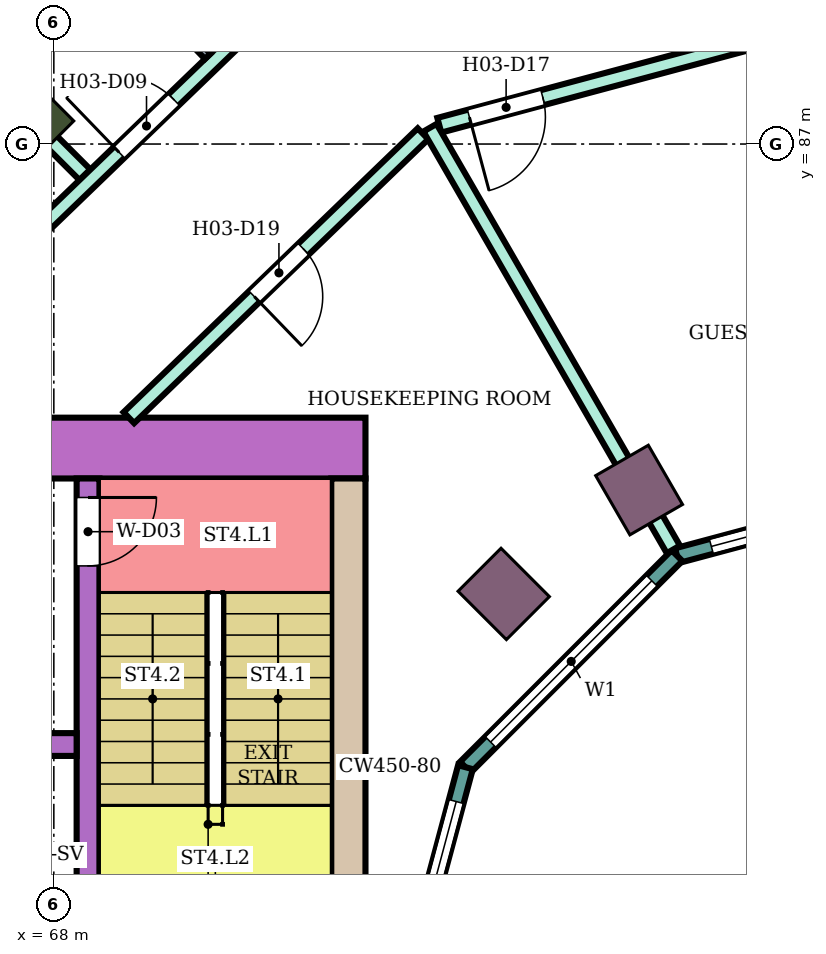
"""IFC4 building model, lengths in metres.
Left out: names, types, materials, properties, quantities, classifications, styles, units other than length and angle.
Written with IfcOpenShell. Run it as: python <this file> out.ifc"""

import sys

from ifc_helpers import new_model, si_unit, direction, frame, frame_2d, origin, origin_2d, place, context, subcontext, project, spatial, rectangle, extrude, element, fill, save


model = new_model("IFC4")
c1 = context("Model", 3, precision=1e-05, world=origin(), true_north=direction((0.0, 1.0)))
c2 = subcontext(c1, "Body", "Model", "MODEL_VIEW")
j1 = project(units=[si_unit("LENGTHUNIT", "METRE"), si_unit("PLANEANGLEUNIT", "RADIAN")], contexts=[c1])
p1 = place(None, origin())
s1 = spatial("IfcSite", under=j1, at=p1, CompositionType="ELEMENT")
p2 = place(p1, origin())
s2 = spatial("IfcBuilding", under=s1, at=p2, CompositionType="ELEMENT")
p3 = place(p2, frame((0.0, 0.0, 51.6)))
s3 = spatial("IfcBuildingStorey", under=s2, at=p3, CompositionType="ELEMENT", Elevation=51.6)
p4 = place(p3, frame((67.555, 87.445, 0.0), z_axis=(0.0, 0.0, 1.0), x_axis=(-0.707106781187, 0.707106781187, 0.0)))
e1 = element("IfcColumn", 1, at=p4, inside=s3, PredefinedType="COLUMN", context=c2, shape_type="SweptSolid", body=[
    extrude(rectangle(XDim=1.2, YDim=0.8, at=origin_2d()), origin(), (0.0, 0.0, 1.0), 3.8),
])
for number, where, z_axis, x_axis in (
    (2, (75.7, 82.448, 0.0), (0.0, 0.0, 1.0), (-0.5, 0.866, 0.0)),
    (3, (73.919, 81.081, 0.0), (0.0, 0.0, 1.0), (-0.707, 0.707, 0.0)),
):
    element("IfcColumn", number, at=place(p3, frame(where, z_axis=z_axis, x_axis=x_axis)), inside=s3, PredefinedType="COLUMN", context=c2, shape_type="SweptSolid", body=[
        extrude(rectangle(XDim=0.9, YDim=0.8, at=origin_2d()), origin(), (0.0, 0.0, 1.0), 3.8),
    ])
p5 = place(p3, frame((72.1, 83.0, 0.0), z_axis=(0.0, 0.0, 1.0), x_axis=(-1.0, 0.0, 0.0)))
e4 = element("IfcWall", 4, at=p5, inside=s3, PredefinedType="SHEAR", context=c2, shape_type="SweptSolid", body=[
    extrude(rectangle(XDim=14.7, YDim=0.8, at=frame_2d((7.35, 0.0))), origin(), (0.0, 0.0, 1.0), 3.48),
])
p6 = place(p5, frame((4.2, 0.0, 0.0)))
e5 = element("IfcOpeningElement", 5, at=p6, cuts=e4, PredefinedType="OPENING", context=c2, shape_type="SweptSolid", body=[
    extrude(rectangle(XDim=2.4, YDim=2.4, at=frame_2d((1.2, 1.2))), frame((0.0, 0.41, 0.0), z_axis=(0.0, -1.0, 0.0), x_axis=(1.0, 0.0, 0.0)), (0.0, 0.0, 1.0), 0.82),
])
p7 = place(p3, frame((71.875, 82.6, 0.0), z_axis=(0.0, 0.0, 1.0), x_axis=(0.0, -1.0, 0.0)))
e6 = element("IfcWall", 6, at=p7, inside=s3, PredefinedType="SHEAR", context=c2, shape_type="SweptSolid", body=[
    extrude(rectangle(XDim=7.6, YDim=0.45, at=frame_2d((3.8, 0.0))), origin(), (0.0, 0.0, 1.0), 3.48),
])
p8 = place(p3, frame((68.45, 82.6, 0.0), z_axis=(0.0, 0.0, 1.0), x_axis=(0.0, -1.0, 0.0)))
e7 = element("IfcWall", 7, at=p8, inside=s3, PredefinedType="SHEAR", context=c2, shape_type="SweptSolid", body=[
    extrude(rectangle(XDim=7.6, YDim=0.3, at=frame_2d((3.8, 0.0))), origin(), (0.0, 0.0, 1.0), 3.48),
])
p9 = place(p8, frame((0.25, 0.0, 0.0)))
e8 = element("IfcOpeningElement", 8, at=p9, cuts=e7, PredefinedType="OPENING", context=c2, shape_type="SweptSolid", body=[
    extrude(rectangle(XDim=0.9, YDim=2.1, at=frame_2d((0.45, 1.05))), frame((0.0, 0.16, 0.0), z_axis=(0.0, -1.0, 0.0), x_axis=(1.0, 0.0, 0.0)), (0.0, 0.0, 1.0), 0.32),
])
p10 = place(p3, frame((68.3, 79.1, 0.0), z_axis=(0.0, 0.0, 1.0), x_axis=(-1.0, 0.0, 0.0)))
e9 = element("IfcWall", 9, at=p10, inside=s3, PredefinedType="SHEAR", context=c2, shape_type="SweptSolid", body=[
    extrude(rectangle(XDim=10.9, YDim=0.3, at=frame_2d((5.45, 0.0))), origin(), (0.0, 0.0, 1.0), 3.48),
])
p11 = place(p10, frame((0.4, 0.0, 0.0)))
e10 = element("IfcOpeningElement", 10, at=p11, cuts=e9, PredefinedType="OPENING", context=c2, shape_type="SweptSolid", body=[
    extrude(rectangle(XDim=1.4, YDim=2.1, at=frame_2d((0.7, 1.05))), frame((0.0, 0.16, 0.0), z_axis=(0.0, -1.0, 0.0), x_axis=(1.0, 0.0, 0.0)), (0.0, 0.0, 1.0), 0.32),
])
p12 = place(p10, frame((5.4, 0.0, 0.0)))
e11 = element("IfcOpeningElement", 11, at=p12, cuts=e9, PredefinedType="OPENING", context=c2, shape_type="SweptSolid", body=[
    extrude(rectangle(XDim=1.4, YDim=2.1, at=frame_2d((0.7, 1.05))), frame((0.0, 0.16, 0.0), z_axis=(0.0, -1.0, 0.0), x_axis=(1.0, 0.0, 0.0)), (0.0, 0.0, 1.0), 0.32),
])
p13 = place(p10, frame((8.1, 0.0, 0.0)))
e12 = element("IfcOpeningElement", 12, at=p13, cuts=e9, PredefinedType="OPENING", context=c2, shape_type="SweptSolid", body=[
    extrude(rectangle(XDim=1.0, YDim=2.1, at=frame_2d((0.5, 1.05))), frame((0.0, 0.16, 0.0), z_axis=(0.0, -1.0, 0.0), x_axis=(1.0, 0.0, 0.0)), (0.0, 0.0, 1.0), 0.32),
])
p14 = place(p3, frame((80.0, 82.604, 0.0), z_axis=(0.0, 0.0, 1.0), x_axis=(-0.965933654434, -0.258789828301, 0.0)))
e13 = element("IfcWall", 13, at=p14, inside=s3, PredefinedType="NOTDEFINED", context=c2, shape_type="SweptSolid", body=[
    extrude(rectangle(XDim=3.936, YDim=0.2, at=frame_2d((1.968, 0.0))), origin(), (0.0, 0.0, 1.0), 3.8),
])
p15 = place(p14, frame((0.468, 0.0, 0.9)))
e14 = element("IfcOpeningElement", 14, at=p15, cuts=e13, PredefinedType="OPENING", context=c2, shape_type="SweptSolid", body=[
    extrude(rectangle(XDim=3.0, YDim=2.3, at=frame_2d((1.5, 1.15))), frame((0.0, 0.11, 0.0), z_axis=(0.0, -1.0, 0.0), x_axis=(1.0, 0.0, 0.0)), (0.0, 0.0, 1.0), 0.22),
])
p16 = place(p3, frame((76.198, 81.585, 0.0), z_axis=(0.0, 0.0, 1.0), x_axis=(-0.707106781187, -0.707106781187, 0.0)))
e15 = element("IfcWall", 15, at=p16, inside=s3, PredefinedType="NOTDEFINED", context=c2, shape_type="SweptSolid", body=[
    extrude(rectangle(XDim=3.936, YDim=0.2, at=frame_2d((1.968, 0.0))), origin(), (0.0, 0.0, 1.0), 3.8),
])
p17 = place(p16, frame((0.468, 0.0, 0.9)))
e16 = element("IfcOpeningElement", 16, at=p17, cuts=e15, PredefinedType="OPENING", context=c2, shape_type="SweptSolid", body=[
    extrude(rectangle(XDim=3.0, YDim=2.3, at=frame_2d((1.5, 1.15))), frame((0.0, 0.11, 0.0), z_axis=(0.0, -1.0, 0.0), x_axis=(1.0, 0.0, 0.0)), (0.0, 0.0, 1.0), 0.22),
])
p18 = place(p3, frame((73.415, 78.802, 0.0), z_axis=(0.0, 0.0, 1.0), x_axis=(-0.258789828301, -0.965933654434, 0.0)))
e17 = element("IfcWall", 17, at=p18, inside=s3, PredefinedType="NOTDEFINED", context=c2, shape_type="SweptSolid", body=[
    extrude(rectangle(XDim=3.936, YDim=0.2, at=frame_2d((1.968, 0.0))), origin(), (0.0, 0.0, 1.0), 3.8),
])
p19 = place(p18, frame((0.468, 0.0, 0.9)))
e18 = element("IfcOpeningElement", 18, at=p19, cuts=e17, PredefinedType="OPENING", context=c2, shape_type="SweptSolid", body=[
    extrude(rectangle(XDim=3.0, YDim=2.3, at=frame_2d((1.5, 1.15))), frame((0.0, 0.11, 0.0), z_axis=(0.0, -1.0, 0.0), x_axis=(1.0, 0.0, 0.0)), (0.0, 0.0, 1.0), 0.22),
])
p20 = place(p3, frame((63.598, 91.408, 0.0), z_axis=(0.0, 0.0, 1.0), x_axis=(0.706999146394, -0.707214399597, 0.0)))
e19 = element("IfcWall", 19, at=p20, inside=s3, PredefinedType="PARTITIONING", context=c2, shape_type="SweptSolid", body=[
    extrude(rectangle(XDim=6.805, YDim=0.2, at=frame_2d((3.403, 0.0))), origin(), (0.0, 0.0, 1.0), 3.35),
])
p21 = place(p3, frame((66.797, 84.9, 0.0), z_axis=(0.0, 0.0, 1.0), x_axis=(0.719692092412, 0.694293376116, 0.0)))
e20 = element("IfcWall", 20, at=p21, inside=s3, PredefinedType="PARTITIONING", context=c2, shape_type="SweptSolid", body=[
    extrude(rectangle(XDim=6.584, YDim=0.2, at=frame_2d((3.292, 0.0))), origin(), (0.0, 0.0, 1.0), 3.35),
])
p22 = place(p21, frame((2.866, 0.0, 0.0)))
e21 = element("IfcOpeningElement", 21, at=p22, cuts=e20, PredefinedType="OPENING", context=c2, shape_type="SweptSolid", body=[
    extrude(rectangle(XDim=1.0, YDim=2.1, at=frame_2d((0.5, 1.05))), frame((0.0, 0.11, 0.0), z_axis=(0.0, -1.0, 0.0), x_axis=(1.0, 0.0, 0.0)), (0.0, 0.0, 1.0), 0.22),
])
p23 = place(p3, frame((68.987, 83.4, 0.0), z_axis=(0.0, 0.0, 1.0), x_axis=(0.719547721855, 0.694442996922, 0.0)))
e22 = element("IfcWall", 22, at=p23, inside=s3, PredefinedType="PARTITIONING", context=c2, shape_type="SweptSolid", body=[
    extrude(rectangle(XDim=5.378, YDim=0.2, at=frame_2d((2.689, 0.0))), origin(), (0.0, 0.0, 1.0), 3.35),
])
p24 = place(p23, frame((2.294, 0.0, 0.0)))
e23 = element("IfcOpeningElement", 23, at=p24, cuts=e22, PredefinedType="OPENING", context=c2, shape_type="SweptSolid", body=[
    extrude(rectangle(XDim=0.9, YDim=2.1, at=frame_2d((0.45, 1.05))), frame((0.0, 0.11, 0.0), z_axis=(0.0, -1.0, 0.0), x_axis=(1.0, 0.0, 0.0)), (0.0, 0.0, 1.0), 0.22),
])
p25 = place(p3, frame((73.071, 87.247, 0.0), z_axis=(0.0, 0.0, 1.0), x_axis=(0.965931651205, 0.258797305243, 0.0)))
e24 = element("IfcWall", 24, at=p25, inside=s3, PredefinedType="PARTITIONING", context=c2, shape_type="SweptSolid", body=[
    extrude(rectangle(XDim=7.043, YDim=0.2, at=frame_2d((3.521, 0.0))), origin(), (0.0, 0.0, 1.0), 3.35),
])
p26 = place(p25, frame((0.41, 0.0, 0.0)))
e25 = element("IfcOpeningElement", 25, at=p26, cuts=e24, PredefinedType="OPENING", context=c2, shape_type="SweptSolid", body=[
    extrude(rectangle(XDim=1.0, YDim=2.1, at=frame_2d((0.5, 1.05))), frame((0.0, 0.11, 0.0), z_axis=(0.0, -1.0, 0.0), x_axis=(1.0, 0.0, 0.0)), (0.0, 0.0, 1.0), 0.22),
])
p27 = place(p3, frame((72.949, 87.214, 0.0), z_axis=(0.0, 0.0, 1.0), x_axis=(0.499927021214, -0.866067534006, 0.0)))
e26 = element("IfcWall", 26, at=p27, inside=s3, PredefinedType="PARTITIONING", context=c2, shape_type="SweptSolid", body=[
    extrude(rectangle(XDim=6.405, YDim=0.2, at=frame_2d((3.203, 0.0))), origin(), (0.0, 0.0, 1.0), 3.35),
])
p28 = place(p3, frame((68.185, 90.06, 0.0), z_axis=(0.0, 0.0, 1.0), x_axis=(0.69446127412, -0.719530081892, 0.0)))
e27 = element("IfcWall", 27, at=p28, inside=s3, PredefinedType="PARTITIONING", context=c2, shape_type="SweptSolid", body=[
    extrude(rectangle(XDim=2.649, YDim=0.1, at=frame_2d((1.324, 0.0))), origin(), (0.0, 0.0, 1.0), 3.35),
])
p29 = place(p28, frame((0.95, 0.0, 0.0)))
e28 = element("IfcOpeningElement", 28, at=p29, cuts=e27, PredefinedType="OPENING", context=c2, shape_type="SweptSolid", body=[
    extrude(rectangle(XDim=0.8, YDim=2.1, at=frame_2d((0.4, 1.05))), frame((0.0, 0.06, 0.0), z_axis=(0.0, -1.0, 0.0), x_axis=(1.0, 0.0, 0.0)), (0.0, 0.0, 1.0), 0.12),
])
p30 = place(p15, origin())
e29 = element("IfcWindow", 29, at=p30, inside=s3, PartitioningType="SINGLE_PANEL", PredefinedType="WINDOW", context=c2, shape_type="SweptSolid", body=[
    extrude(rectangle(XDim=3.0, YDim=2.3, at=frame_2d((1.5, 1.15))), frame((0.0, 0.03, 0.0), z_axis=(0.0, -1.0, 0.0), x_axis=(1.0, 0.0, 0.0)), (0.0, 0.0, 1.0), 0.06),
])
fill(e14, e29)
p31 = place(p17, origin())
e30 = element("IfcWindow", 30, at=p31, inside=s3, PartitioningType="SINGLE_PANEL", PredefinedType="WINDOW", context=c2, shape_type="SweptSolid", body=[
    extrude(rectangle(XDim=3.0, YDim=2.3, at=frame_2d((1.5, 1.15))), frame((0.0, 0.03, 0.0), z_axis=(0.0, -1.0, 0.0), x_axis=(1.0, 0.0, 0.0)), (0.0, 0.0, 1.0), 0.06),
])
fill(e16, e30)
p32 = place(p19, origin())
e31 = element("IfcWindow", 31, at=p32, inside=s3, PartitioningType="SINGLE_PANEL", PredefinedType="WINDOW", context=c2, shape_type="SweptSolid", body=[
    extrude(rectangle(XDim=3.0, YDim=2.3, at=frame_2d((1.5, 1.15))), frame((0.0, 0.03, 0.0), z_axis=(0.0, -1.0, 0.0), x_axis=(1.0, 0.0, 0.0)), (0.0, 0.0, 1.0), 0.06),
])
fill(e18, e31)
p33 = place(p22, origin())
e32 = element("IfcDoor", 32, at=p33, inside=s3, OperationType="SINGLE_SWING_LEFT", PredefinedType="DOOR", context=c2, shape_type="SweptSolid", body=[
    extrude(rectangle(XDim=1.0, YDim=2.1, at=frame_2d((0.5, 1.05))), frame((0.0, 0.025, 0.0), z_axis=(0.0, -1.0, 0.0), x_axis=(1.0, 0.0, 0.0)), (0.0, 0.0, 1.0), 0.05),
])
fill(e21, e32)
p34 = place(p26, frame((1.0, 0.0, 0.0), z_axis=(0.0, 0.0, 1.0), x_axis=(-1.0, 0.0, 0.0)))
e33 = element("IfcDoor", 33, at=p34, inside=s3, OperationType="SINGLE_SWING_RIGHT", PredefinedType="DOOR", context=c2, shape_type="SweptSolid", body=[
    extrude(rectangle(XDim=1.0, YDim=2.1, at=frame_2d((0.5, 1.05))), frame((0.0, 0.025, 0.0), z_axis=(0.0, -1.0, 0.0), x_axis=(1.0, 0.0, 0.0)), (0.0, 0.0, 1.0), 0.05),
])
fill(e25, e33)
p35 = place(p24, frame((0.9, 0.0, 0.0), z_axis=(0.0, 0.0, 1.0), x_axis=(-1.0, 0.0, 0.0)))
e34 = element("IfcDoor", 34, at=p35, inside=s3, OperationType="SINGLE_SWING_RIGHT", PredefinedType="DOOR", context=c2, shape_type="SweptSolid", body=[
    extrude(rectangle(XDim=0.9, YDim=2.1, at=frame_2d((0.45, 1.05))), frame((0.0, 0.025, 0.0), z_axis=(0.0, -1.0, 0.0), x_axis=(1.0, 0.0, 0.0)), (0.0, 0.0, 1.0), 0.05),
])
fill(e23, e34)
p36 = place(p9, origin())
e35 = element("IfcDoor", 35, at=p36, inside=s3, OperationType="SINGLE_SWING_LEFT", PredefinedType="DOOR", context=c2, shape_type="SweptSolid", body=[
    extrude(rectangle(XDim=0.9, YDim=2.1, at=frame_2d((0.45, 1.05))), frame((0.0, 0.025, 0.0), z_axis=(0.0, -1.0, 0.0), x_axis=(1.0, 0.0, 0.0)), (0.0, 0.0, 1.0), 0.05),
])
fill(e8, e35)
save(model, sys.argv[1])
